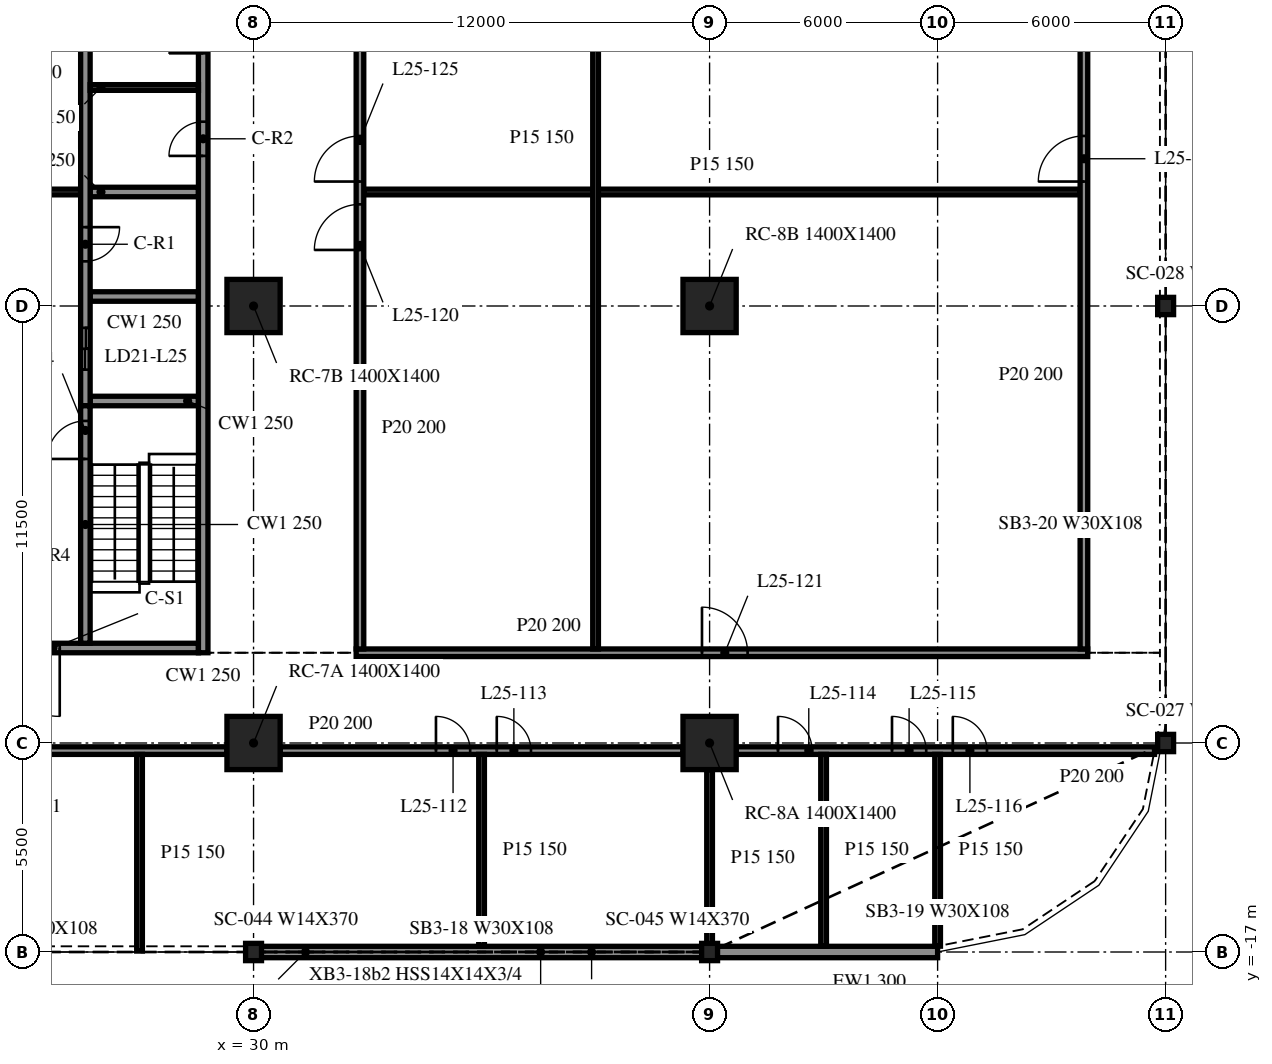
"""IFC4 building model, lengths in metres.
Left out: names, types, materials, properties, quantities, classifications, styles, units other than length and angle.
Written with IfcOpenShell. Run it as: python <this file> out.ifc"""

import sys

from ifc_helpers import new_model, si_unit, direction, frame, frame_2d, origin, origin_2d, place, context, subcontext, project, spatial, rectangle, i_section, extrude, element, fill, save


model = new_model("IFC4")
c1 = context("Model", 3, precision=1e-05, world=origin(), true_north=direction((0.0, 1.0)))
c2 = subcontext(c1, "Body", "Model", "MODEL_VIEW")
j1 = project(units=[si_unit("LENGTHUNIT", "METRE"), si_unit("PLANEANGLEUNIT", "RADIAN")], contexts=[c1])
p1 = place(None, origin())
s1 = spatial("IfcSite", under=j1, at=p1, CompositionType="ELEMENT")
p2 = place(p1, origin())
s2 = spatial("IfcBuilding", under=s1, at=p2, CompositionType="ELEMENT")
p3 = place(p2, frame((0.0, 0.0, 109.4)))
s3 = spatial("IfcBuildingStorey", under=s2, at=p3, CompositionType="ELEMENT", Elevation=109.4)
for number, where, z_axis, x_axis in (
    (1, (30.0, -11.5, -0.34), (0.0, 0.0, 1.0), (1.0, 0.0, 0.0)),
    (2, (30.0, 0.0, -0.34), (0.0, 0.0, 1.0), (1.0, 0.0, 0.0)),
    (3, (42.0, -11.5, -0.34), (0.0, 0.0, 1.0), (1.0, 0.0, 0.0)),
    (4, (42.0, 0.0, -0.34), (0.0, 0.0, 1.0), (1.0, 0.0, 0.0)),
):
    element("IfcColumn", number, at=place(p3, frame(where, z_axis=z_axis, x_axis=x_axis)), inside=s3, PredefinedType="COLUMN", context=c2, shape_type="SweptSolid", body=[
        extrude(rectangle(XDim=1.4, YDim=1.4, at=origin_2d()), origin(), (0.0, 0.0, 1.0), 4.1),
    ])
for number, where, z_axis, x_axis in (
    (5, (30.0, -17.0, -0.34), (0.0, 0.0, 1.0), (1.0, 0.0, 0.0)),
    (6, (42.0, -17.0, -0.34), (0.0, 0.0, 1.0), (1.0, 0.0, 0.0)),
    (7, (54.0, -11.5, -0.34), (0.0, 0.0, 1.0), (1.0, 0.0, 0.0)),
    (8, (54.0, 0.0, -0.34), (0.0, 0.0, 1.0), (1.0, 0.0, 0.0)),
):
    element("IfcColumn", number, at=place(p3, frame(where, z_axis=z_axis, x_axis=x_axis)), inside=s3, PredefinedType="COLUMN", context=c2, shape_type="SweptSolid", body=[
        extrude(i_section(OverallWidth=0.419, OverallDepth=0.455, WebThickness=0.042, FlangeThickness=0.068, at=origin_2d()), origin(), (0.0, 0.0, 1.0), 4.1),
    ])
p4 = place(p3, frame((30.021, -17.0, 0.0), z_axis=(0.0, 0.0, 1.0), x_axis=(1.0, 0.0, 0.0)))
e9 = element("IfcWall", 9, at=p4, inside=s3, PredefinedType="NOTDEFINED", context=c2, shape_type="SweptSolid", body=[
    extrude(rectangle(XDim=11.958, YDim=0.3, at=frame_2d((5.979, 0.0))), origin(), (0.0, 0.0, 1.0), 3.003),
])
p5 = place(p3, frame((42.021, -17.0, 0.0), z_axis=(0.0, 0.0, 1.0), x_axis=(1.0, 0.0, 0.0)))
e10 = element("IfcWall", 10, at=p5, inside=s3, PredefinedType="NOTDEFINED", context=c2, shape_type="SweptSolid", body=[
    extrude(rectangle(XDim=5.979, YDim=0.3, at=frame_2d((2.99, 0.0))), origin(), (0.0, 0.0, 1.0), 3.003),
])
p6 = place(p3, frame((28.675, -9.125, 0.0), z_axis=(0.0, 0.0, 1.0), x_axis=(0.0, 1.0, 0.0)))
e11 = element("IfcWall", 11, at=p6, inside=s3, PredefinedType="SOLIDWALL", context=c2, shape_type="SweptSolid", body=[
    extrude(rectangle(XDim=24.25, YDim=0.25, at=frame_2d((12.125, 0.0))), origin(), (0.0, 0.0, 1.0), 3.76),
])
p7 = place(p6, frame((13.075, 0.0, 0.0)))
e12 = element("IfcOpeningElement", 12, at=p7, cuts=e11, PredefinedType="OPENING", context=c2, shape_type="SweptSolid", body=[
    extrude(rectangle(XDim=0.9, YDim=2.1, at=frame_2d((0.45, 1.05))), frame((0.0, 0.135, 0.0), z_axis=(0.0, -1.0, 0.0), x_axis=(1.0, 0.0, 0.0)), (0.0, 0.0, 1.0), 0.27),
])
p8 = place(p6, frame((15.775, 0.0, 0.0)))
e13 = element("IfcOpeningElement", 13, at=p8, cuts=e11, PredefinedType="OPENING", context=c2, shape_type="SweptSolid", body=[
    extrude(rectangle(XDim=0.9, YDim=2.1, at=frame_2d((0.45, 1.05))), frame((0.0, 0.135, 0.0), z_axis=(0.0, -1.0, 0.0), x_axis=(1.0, 0.0, 0.0)), (0.0, 0.0, 1.0), 0.27),
])
p9 = place(p6, frame((18.712, 0.0, 0.0)))
e14 = element("IfcOpeningElement", 14, at=p9, cuts=e11, PredefinedType="OPENING", context=c2, shape_type="SweptSolid", body=[
    extrude(rectangle(XDim=0.9, YDim=2.1, at=frame_2d((0.45, 1.05))), frame((0.0, 0.135, 0.0), z_axis=(0.0, -1.0, 0.0), x_axis=(1.0, 0.0, 0.0)), (0.0, 0.0, 1.0), 0.27),
])
p10 = place(p6, frame((21.788, 0.0, 0.0)))
e15 = element("IfcOpeningElement", 15, at=p10, cuts=e11, PredefinedType="OPENING", context=c2, shape_type="SweptSolid", body=[
    extrude(rectangle(XDim=0.9, YDim=2.1, at=frame_2d((0.45, 1.05))), frame((0.0, 0.135, 0.0), z_axis=(0.0, -1.0, 0.0), x_axis=(1.0, 0.0, 0.0)), (0.0, 0.0, 1.0), 0.27),
])
p11 = place(p3, frame((28.55, -9.0, 0.0), z_axis=(0.0, 0.0, 1.0), x_axis=(-1.0, 0.0, 0.0)))
e16 = element("IfcWall", 16, at=p11, inside=s3, PredefinedType="SOLIDWALL", context=c2, shape_type="SweptSolid", body=[
    extrude(rectangle(XDim=9.1, YDim=0.25, at=frame_2d((4.55, 0.0))), origin(), (0.0, 0.0, 1.0), 3.76),
])
p12 = place(p11, frame((3.65, 0.0, 0.0)))
e17 = element("IfcOpeningElement", 17, at=p12, cuts=e16, PredefinedType="OPENING", context=c2, shape_type="SweptSolid", body=[
    extrude(rectangle(XDim=1.8, YDim=2.1, at=frame_2d((0.9, 1.05))), frame((0.0, 0.135, 0.0), z_axis=(0.0, -1.0, 0.0), x_axis=(1.0, 0.0, 0.0)), (0.0, 0.0, 1.0), 0.27),
])
p13 = place(p3, frame((25.575, -8.875, 0.0), z_axis=(0.0, 0.0, 1.0), x_axis=(0.0, 1.0, 0.0)))
e18 = element("IfcWall", 18, at=p13, inside=s3, PredefinedType="SOLIDWALL", context=c2, shape_type="SweptSolid", body=[
    extrude(rectangle(XDim=6.25, YDim=0.25, at=frame_2d((3.125, 0.0))), origin(), (0.0, 0.0, 1.0), 3.76),
])
p14 = place(p13, frame((4.85, 0.0, 0.0)))
e19 = element("IfcOpeningElement", 19, at=p14, cuts=e18, PredefinedType="OPENING", context=c2, shape_type="SweptSolid", body=[
    extrude(rectangle(XDim=1.0, YDim=2.1, at=frame_2d((0.5, 1.05))), frame((0.0, 0.135, 0.0), z_axis=(0.0, -1.0, 0.0), x_axis=(1.0, 0.0, 0.0)), (0.0, 0.0, 1.0), 0.27),
])
p15 = place(p3, frame((25.575, 14.875, 0.0), z_axis=(0.0, 0.0, 1.0), x_axis=(0.0, -1.0, 0.0)))
e20 = element("IfcWall", 20, at=p15, inside=s3, PredefinedType="SOLIDWALL", context=c2, shape_type="SweptSolid", body=[
    extrude(rectangle(XDim=17.5, YDim=0.25, at=frame_2d((8.75, 0.0))), origin(), (0.0, 0.0, 1.0), 3.76),
])
p16 = place(p15, frame((15.45, 0.0, 0.0)))
e21 = element("IfcOpeningElement", 21, at=p16, cuts=e20, PredefinedType="OPENING", context=c2, shape_type="SweptSolid", body=[
    extrude(rectangle(XDim=1.1, YDim=2.1, at=frame_2d((0.55, 1.05))), frame((0.0, 0.135, 0.0), z_axis=(0.0, -1.0, 0.0), x_axis=(1.0, 0.0, 0.0)), (0.0, 0.0, 1.0), 0.27),
])
p17 = place(p15, frame((12.8, 0.0, 0.0)))
e22 = element("IfcOpeningElement", 22, at=p17, cuts=e20, PredefinedType="OPENING", context=c2, shape_type="SweptSolid", body=[
    extrude(rectangle(XDim=0.9, YDim=2.1, at=frame_2d((0.45, 1.05))), frame((0.0, 0.135, 0.0), z_axis=(0.0, -1.0, 0.0), x_axis=(1.0, 0.0, 0.0)), (0.0, 0.0, 1.0), 0.27),
])
for number, where, z_axis, x_axis in (
    (23, (25.7, -2.5, 0.0), (0.0, 0.0, 1.0), (1.0, 0.0, 0.0)),
    (24, (25.7, 0.25, 0.0), (0.0, 0.0, 1.0), (1.0, 0.0, 0.0)),
    (25, (25.7, 3.0, 0.0), (0.0, 0.0, 1.0), (1.0, 0.0, 0.0)),
):
    element("IfcWall", number, at=place(p3, frame(where, z_axis=z_axis, x_axis=x_axis)), inside=s3, PredefinedType="SOLIDWALL", context=c2, shape_type="SweptSolid", body=[
        extrude(rectangle(XDim=2.85, YDim=0.25, at=frame_2d((1.425, 0.0))), origin(), (0.0, 0.0, 1.0), 3.76),
    ])
p18 = place(p3, frame((22.55, 3.0, 0.0), z_axis=(0.0, 0.0, 1.0), x_axis=(1.0, 0.0, 0.0)))
e26 = element("IfcWall", 26, at=p18, inside=s3, PredefinedType="PARTITIONING", context=c2, shape_type="SweptSolid", body=[
    extrude(rectangle(XDim=2.9, YDim=0.15, at=frame_2d((1.45, 0.0))), origin(), (0.0, 0.0, 1.0), 3.76),
])
p19 = place(p3, frame((25.7, 5.75, 0.0), z_axis=(0.0, 0.0, 1.0), x_axis=(1.0, 0.0, 0.0)))
e27 = element("IfcWall", 27, at=p19, inside=s3, PredefinedType="PARTITIONING", context=c2, shape_type="SweptSolid", body=[
    extrude(rectangle(XDim=2.85, YDim=0.15, at=frame_2d((1.425, 0.0))), origin(), (0.0, 0.0, 1.0), 3.76),
])
p20 = place(p3, frame((18.7, -11.7, 0.0), z_axis=(0.0, 0.0, 1.0), x_axis=(1.0, 0.0, 0.0)))
e28 = element("IfcWall", 28, at=p20, inside=s3, PredefinedType="PARTITIONING", context=c2, shape_type="SweptSolid", body=[
    extrude(rectangle(XDim=10.6, YDim=0.2, at=frame_2d((5.3, 0.0))), origin(), (0.0, 0.0, 1.0), 3.76),
])
p21 = place(p20, frame((4.9, 0.0, 0.0)))
e29 = element("IfcOpeningElement", 29, at=p21, cuts=e28, PredefinedType="OPENING", context=c2, shape_type="SweptSolid", body=[
    extrude(rectangle(XDim=0.9, YDim=2.1, at=frame_2d((0.45, 1.05))), frame((0.0, 0.11, 0.0), z_axis=(0.0, -1.0, 0.0), x_axis=(1.0, 0.0, 0.0)), (0.0, 0.0, 1.0), 0.22),
])
p22 = place(p3, frame((30.7, -11.7, 0.0), z_axis=(0.0, 0.0, 1.0), x_axis=(1.0, 0.0, 0.0)))
e30 = element("IfcWall", 30, at=p22, inside=s3, PredefinedType="PARTITIONING", context=c2, shape_type="SweptSolid", body=[
    extrude(rectangle(XDim=10.6, YDim=0.2, at=frame_2d((5.3, 0.0))), origin(), (0.0, 0.0, 1.0), 3.76),
])
p23 = place(p22, frame((4.1, 0.0, 0.0)))
e31 = element("IfcOpeningElement", 31, at=p23, cuts=e30, PredefinedType="OPENING", context=c2, shape_type="SweptSolid", body=[
    extrude(rectangle(XDim=0.9, YDim=2.1, at=frame_2d((0.45, 1.05))), frame((0.0, 0.11, 0.0), z_axis=(0.0, -1.0, 0.0), x_axis=(1.0, 0.0, 0.0)), (0.0, 0.0, 1.0), 0.22),
])
p24 = place(p22, frame((5.7, 0.0, 0.0)))
e32 = element("IfcOpeningElement", 32, at=p24, cuts=e30, PredefinedType="OPENING", context=c2, shape_type="SweptSolid", body=[
    extrude(rectangle(XDim=0.9, YDim=2.1, at=frame_2d((0.45, 1.05))), frame((0.0, 0.11, 0.0), z_axis=(0.0, -1.0, 0.0), x_axis=(1.0, 0.0, 0.0)), (0.0, 0.0, 1.0), 0.22),
])
p25 = place(p3, frame((42.7, -11.7, 0.0), z_axis=(0.0, 0.0, 1.0), x_axis=(1.0, 0.0, 0.0)))
e33 = element("IfcWall", 33, at=p25, inside=s3, PredefinedType="PARTITIONING", context=c2, shape_type="SweptSolid", body=[
    extrude(rectangle(XDim=11.008, YDim=0.2, at=frame_2d((5.504, 0.0))), origin(), (0.0, 0.0, 1.0), 3.76),
])
p26 = place(p25, frame((1.1, 0.0, 0.0)))
e34 = element("IfcOpeningElement", 34, at=p26, cuts=e33, PredefinedType="OPENING", context=c2, shape_type="SweptSolid", body=[
    extrude(rectangle(XDim=0.9, YDim=2.1, at=frame_2d((0.45, 1.05))), frame((0.0, 0.11, 0.0), z_axis=(0.0, -1.0, 0.0), x_axis=(1.0, 0.0, 0.0)), (0.0, 0.0, 1.0), 0.22),
])
p27 = place(p25, frame((4.1, 0.0, 0.0)))
e35 = element("IfcOpeningElement", 35, at=p27, cuts=e33, PredefinedType="OPENING", context=c2, shape_type="SweptSolid", body=[
    extrude(rectangle(XDim=0.9, YDim=2.1, at=frame_2d((0.45, 1.05))), frame((0.0, 0.11, 0.0), z_axis=(0.0, -1.0, 0.0), x_axis=(1.0, 0.0, 0.0)), (0.0, 0.0, 1.0), 0.22),
])
p28 = place(p25, frame((5.7, 0.0, 0.0)))
e36 = element("IfcOpeningElement", 36, at=p28, cuts=e33, PredefinedType="OPENING", context=c2, shape_type="SweptSolid", body=[
    extrude(rectangle(XDim=0.9, YDim=2.1, at=frame_2d((0.45, 1.05))), frame((0.0, 0.11, 0.0), z_axis=(0.0, -1.0, 0.0), x_axis=(1.0, 0.0, 0.0)), (0.0, 0.0, 1.0), 0.22),
])
p29 = place(p3, frame((32.7, -9.125, 0.0), z_axis=(0.0, 0.0, 1.0), x_axis=(1.0, 0.0, 0.0)))
e37 = element("IfcWall", 37, at=p29, inside=s3, PredefinedType="PARTITIONING", context=c2, shape_type="SweptSolid", body=[
    extrude(rectangle(XDim=19.25, YDim=0.2, at=frame_2d((9.625, 0.0))), origin(), (0.0, 0.0, 1.0), 3.76),
])
p30 = place(p29, frame((9.1, 0.0, 0.0)))
e38 = element("IfcOpeningElement", 38, at=p30, cuts=e37, PredefinedType="OPENING", context=c2, shape_type="SweptSolid", body=[
    extrude(rectangle(XDim=1.2, YDim=2.1, at=frame_2d((0.6, 1.05))), frame((0.0, 0.11, 0.0), z_axis=(0.0, -1.0, 0.0), x_axis=(1.0, 0.0, 0.0)), (0.0, 0.0, 1.0), 0.22),
])
p31 = place(p3, frame((32.9, 3.0, 0.0), z_axis=(0.0, 0.0, 1.0), x_axis=(1.0, 0.0, 0.0)))
e39 = element("IfcWall", 39, at=p31, inside=s3, PredefinedType="PARTITIONING", context=c2, shape_type="SweptSolid", body=[
    extrude(rectangle(XDim=18.85, YDim=0.15, at=frame_2d((9.425, 0.0))), origin(), (0.0, 0.0, 1.0), 3.76),
])
p32 = place(p3, frame((27.0, -16.975, 0.0), z_axis=(0.0, 0.0, 1.0), x_axis=(0.0, 1.0, 0.0)))
e40 = element("IfcWall", 40, at=p32, inside=s3, PredefinedType="PARTITIONING", context=c2, shape_type="SweptSolid", body=[
    extrude(rectangle(XDim=5.175, YDim=0.15, at=frame_2d((2.587, 0.0))), origin(), (0.0, 0.0, 1.0), 3.76),
])
p33 = place(p3, frame((32.8, -9.025, 0.0), z_axis=(0.0, 0.0, 1.0), x_axis=(0.0, 1.0, 0.0)))
e41 = element("IfcWall", 41, at=p33, inside=s3, PredefinedType="PARTITIONING", context=c2, shape_type="SweptSolid", body=[
    extrude(rectangle(XDim=24.05, YDim=0.2, at=frame_2d((12.025, 0.0))), origin(), (0.0, 0.0, 1.0), 3.76),
])
p34 = place(p33, frame((10.5, 0.0, 0.0)))
e42 = element("IfcOpeningElement", 42, at=p34, cuts=e41, PredefinedType="OPENING", context=c2, shape_type="SweptSolid", body=[
    extrude(rectangle(XDim=1.2, YDim=2.1, at=frame_2d((0.6, 1.05))), frame((0.0, 0.11, 0.0), z_axis=(0.0, -1.0, 0.0), x_axis=(1.0, 0.0, 0.0)), (0.0, 0.0, 1.0), 0.22),
])
p35 = place(p33, frame((12.3, 0.0, 0.0)))
e43 = element("IfcOpeningElement", 43, at=p35, cuts=e41, PredefinedType="OPENING", context=c2, shape_type="SweptSolid", body=[
    extrude(rectangle(XDim=1.2, YDim=2.1, at=frame_2d((0.6, 1.05))), frame((0.0, 0.11, 0.0), z_axis=(0.0, -1.0, 0.0), x_axis=(1.0, 0.0, 0.0)), (0.0, 0.0, 1.0), 0.22),
])
p36 = place(p3, frame((36.0, -16.85, 0.0), z_axis=(0.0, 0.0, 1.0), x_axis=(0.0, 1.0, 0.0)))
e44 = element("IfcWall", 44, at=p36, inside=s3, PredefinedType="PARTITIONING", context=c2, shape_type="SweptSolid", body=[
    extrude(rectangle(XDim=5.05, YDim=0.15, at=frame_2d((2.525, 0.0))), origin(), (0.0, 0.0, 1.0), 3.76),
])
p37 = place(p3, frame((39.0, -9.025, 0.0), z_axis=(0.0, 0.0, 1.0), x_axis=(0.0, 1.0, 0.0)))
e45 = element("IfcWall", 45, at=p37, inside=s3, PredefinedType="PARTITIONING", context=c2, shape_type="SweptSolid", body=[
    extrude(rectangle(XDim=24.05, YDim=0.15, at=frame_2d((12.025, 0.0))), origin(), (0.0, 0.0, 1.0), 3.76),
])
p38 = place(p3, frame((42.0, -16.85, 0.0), z_axis=(0.0, 0.0, 1.0), x_axis=(0.0, 1.0, 0.0)))
e46 = element("IfcWall", 46, at=p38, inside=s3, PredefinedType="PARTITIONING", context=c2, shape_type="SweptSolid", body=[
    extrude(rectangle(XDim=4.65, YDim=0.15, at=frame_2d((2.325, 0.0))), origin(), (0.0, 0.0, 1.0), 3.76),
])
p39 = place(p3, frame((45.0, -16.85, 0.0), z_axis=(0.0, 0.0, 1.0), x_axis=(0.0, 1.0, 0.0)))
e47 = element("IfcWall", 47, at=p39, inside=s3, PredefinedType="PARTITIONING", context=c2, shape_type="SweptSolid", body=[
    extrude(rectangle(XDim=5.05, YDim=0.15, at=frame_2d((2.525, 0.0))), origin(), (0.0, 0.0, 1.0), 3.76),
])
p40 = place(p3, frame((48.0, -16.847, 0.0), z_axis=(0.0, 0.0, 1.0), x_axis=(0.0, 1.0, 0.0)))
e48 = element("IfcWall", 48, at=p40, inside=s3, PredefinedType="PARTITIONING", context=c2, shape_type="SweptSolid", body=[
    extrude(rectangle(XDim=5.047, YDim=0.15, at=frame_2d((2.523, 0.0))), origin(), (0.0, 0.0, 1.0), 3.76),
])
p41 = place(p3, frame((51.85, -9.025, 0.0), z_axis=(0.0, 0.0, 1.0), x_axis=(0.0, 1.0, 0.0)))
e49 = element("IfcWall", 49, at=p41, inside=s3, PredefinedType="PARTITIONING", context=c2, shape_type="SweptSolid", body=[
    extrude(rectangle(XDim=24.05, YDim=0.2, at=frame_2d((12.025, 0.0))), origin(), (0.0, 0.0, 1.0), 3.76),
])
p42 = place(p41, frame((12.3, 0.0, 0.0)))
e50 = element("IfcOpeningElement", 50, at=p42, cuts=e49, PredefinedType="OPENING", context=c2, shape_type="SweptSolid", body=[
    extrude(rectangle(XDim=1.2, YDim=2.1, at=frame_2d((0.6, 1.05))), frame((0.0, 0.11, 0.0), z_axis=(0.0, -1.0, 0.0), x_axis=(1.0, 0.0, 0.0)), (0.0, 0.0, 1.0), 0.22),
])
p43 = place(p12, origin())
e51 = element("IfcDoor", 51, at=p43, inside=s3, OperationType="DOUBLE_DOOR_SINGLE_SWING", PredefinedType="DOOR", context=c2, shape_type="SweptSolid", body=[
    extrude(rectangle(XDim=1.8, YDim=2.1, at=frame_2d((0.9, 1.05))), frame((0.0, 0.025, 0.0), z_axis=(0.0, -1.0, 0.0), x_axis=(1.0, 0.0, 0.0)), (0.0, 0.0, 1.0), 0.05),
])
fill(e17, e51)
p44 = place(p16, origin())
e52 = element("IfcDoor", 52, at=p44, inside=s3, OperationType="DOUBLE_DOOR_SLIDING", PredefinedType="DOOR", context=c2, shape_type="SweptSolid", body=[
    extrude(rectangle(XDim=1.1, YDim=2.1, at=frame_2d((0.55, 1.05))), frame((0.0, 0.025, 0.0), z_axis=(0.0, -1.0, 0.0), x_axis=(1.0, 0.0, 0.0)), (0.0, 0.0, 1.0), 0.05),
])
fill(e21, e52)
p45 = place(p17, origin())
e53 = element("IfcDoor", 53, at=p45, inside=s3, OperationType="SINGLE_SWING_LEFT", PredefinedType="DOOR", context=c2, shape_type="SweptSolid", body=[
    extrude(rectangle(XDim=0.9, YDim=2.1, at=frame_2d((0.45, 1.05))), frame((0.0, 0.025, 0.0), z_axis=(0.0, -1.0, 0.0), x_axis=(1.0, 0.0, 0.0)), (0.0, 0.0, 1.0), 0.05),
])
fill(e22, e53)
p46 = place(p7, origin())
e54 = element("IfcDoor", 54, at=p46, inside=s3, OperationType="SINGLE_SWING_RIGHT", PredefinedType="DOOR", context=c2, shape_type="SweptSolid", body=[
    extrude(rectangle(XDim=0.9, YDim=2.1, at=frame_2d((0.45, 1.05))), frame((0.0, 0.025, 0.0), z_axis=(0.0, -1.0, 0.0), x_axis=(1.0, 0.0, 0.0)), (0.0, 0.0, 1.0), 0.05),
])
fill(e12, e54)
p47 = place(p8, origin())
e55 = element("IfcDoor", 55, at=p47, inside=s3, OperationType="SINGLE_SWING_LEFT", PredefinedType="DOOR", context=c2, shape_type="SweptSolid", body=[
    extrude(rectangle(XDim=0.9, YDim=2.1, at=frame_2d((0.45, 1.05))), frame((0.0, 0.025, 0.0), z_axis=(0.0, -1.0, 0.0), x_axis=(1.0, 0.0, 0.0)), (0.0, 0.0, 1.0), 0.05),
])
fill(e13, e55)
p48 = place(p14, origin())
e56 = element("IfcDoor", 56, at=p48, inside=s3, OperationType="SINGLE_SWING_LEFT", PredefinedType="DOOR", context=c2, shape_type="SweptSolid", body=[
    extrude(rectangle(XDim=1.0, YDim=2.1, at=frame_2d((0.5, 1.05))), frame((0.0, 0.025, 0.0), z_axis=(0.0, -1.0, 0.0), x_axis=(1.0, 0.0, 0.0)), (0.0, 0.0, 1.0), 0.05),
])
fill(e19, e56)
p49 = place(p23, origin())
e57 = element("IfcDoor", 57, at=p49, inside=s3, OperationType="SINGLE_SWING_RIGHT", PredefinedType="DOOR", context=c2, shape_type="SweptSolid", body=[
    extrude(rectangle(XDim=0.9, YDim=2.1, at=frame_2d((0.45, 1.05))), frame((0.0, 0.025, 0.0), z_axis=(0.0, -1.0, 0.0), x_axis=(1.0, 0.0, 0.0)), (0.0, 0.0, 1.0), 0.05),
])
fill(e31, e57)
p50 = place(p24, origin())
e58 = element("IfcDoor", 58, at=p50, inside=s3, OperationType="SINGLE_SWING_LEFT", PredefinedType="DOOR", context=c2, shape_type="SweptSolid", body=[
    extrude(rectangle(XDim=0.9, YDim=2.1, at=frame_2d((0.45, 1.05))), frame((0.0, 0.025, 0.0), z_axis=(0.0, -1.0, 0.0), x_axis=(1.0, 0.0, 0.0)), (0.0, 0.0, 1.0), 0.05),
])
fill(e32, e58)
p51 = place(p26, origin())
e59 = element("IfcDoor", 59, at=p51, inside=s3, OperationType="SINGLE_SWING_RIGHT", PredefinedType="DOOR", context=c2, shape_type="SweptSolid", body=[
    extrude(rectangle(XDim=0.9, YDim=2.1, at=frame_2d((0.45, 1.05))), frame((0.0, 0.025, 0.0), z_axis=(0.0, -1.0, 0.0), x_axis=(1.0, 0.0, 0.0)), (0.0, 0.0, 1.0), 0.05),
])
fill(e34, e59)
p52 = place(p27, origin())
e60 = element("IfcDoor", 60, at=p52, inside=s3, OperationType="SINGLE_SWING_RIGHT", PredefinedType="DOOR", context=c2, shape_type="SweptSolid", body=[
    extrude(rectangle(XDim=0.9, YDim=2.1, at=frame_2d((0.45, 1.05))), frame((0.0, 0.025, 0.0), z_axis=(0.0, -1.0, 0.0), x_axis=(1.0, 0.0, 0.0)), (0.0, 0.0, 1.0), 0.05),
])
fill(e35, e60)
p53 = place(p28, origin())
e61 = element("IfcDoor", 61, at=p53, inside=s3, OperationType="SINGLE_SWING_LEFT", PredefinedType="DOOR", context=c2, shape_type="SweptSolid", body=[
    extrude(rectangle(XDim=0.9, YDim=2.1, at=frame_2d((0.45, 1.05))), frame((0.0, 0.025, 0.0), z_axis=(0.0, -1.0, 0.0), x_axis=(1.0, 0.0, 0.0)), (0.0, 0.0, 1.0), 0.05),
])
fill(e36, e61)
p54 = place(p34, origin())
e62 = element("IfcDoor", 62, at=p54, inside=s3, OperationType="SINGLE_SWING_RIGHT", PredefinedType="DOOR", context=c2, shape_type="SweptSolid", body=[
    extrude(rectangle(XDim=1.2, YDim=2.1, at=frame_2d((0.6, 1.05))), frame((0.0, 0.025, 0.0), z_axis=(0.0, -1.0, 0.0), x_axis=(1.0, 0.0, 0.0)), (0.0, 0.0, 1.0), 0.05),
])
fill(e42, e62)
p55 = place(p30, origin())
e63 = element("IfcDoor", 63, at=p55, inside=s3, OperationType="SINGLE_SWING_RIGHT", PredefinedType="DOOR", context=c2, shape_type="SweptSolid", body=[
    extrude(rectangle(XDim=1.2, YDim=2.1, at=frame_2d((0.6, 1.05))), frame((0.0, 0.025, 0.0), z_axis=(0.0, -1.0, 0.0), x_axis=(1.0, 0.0, 0.0)), (0.0, 0.0, 1.0), 0.05),
])
fill(e38, e63)
p56 = place(p35, origin())
e64 = element("IfcDoor", 64, at=p56, inside=s3, OperationType="SINGLE_SWING_LEFT", PredefinedType="DOOR", context=c2, shape_type="SweptSolid", body=[
    extrude(rectangle(XDim=1.2, YDim=2.1, at=frame_2d((0.6, 1.05))), frame((0.0, 0.025, 0.0), z_axis=(0.0, -1.0, 0.0), x_axis=(1.0, 0.0, 0.0)), (0.0, 0.0, 1.0), 0.05),
])
fill(e43, e64)
p57 = place(p42, origin())
e65 = element("IfcDoor", 65, at=p57, inside=s3, OperationType="SINGLE_SWING_RIGHT", PredefinedType="DOOR", context=c2, shape_type="SweptSolid", body=[
    extrude(rectangle(XDim=1.2, YDim=2.1, at=frame_2d((0.6, 1.05))), frame((0.0, 0.025, 0.0), z_axis=(0.0, -1.0, 0.0), x_axis=(1.0, 0.0, 0.0)), (0.0, 0.0, 1.0), 0.05),
])
fill(e50, e65)
save(model, sys.argv[1])
